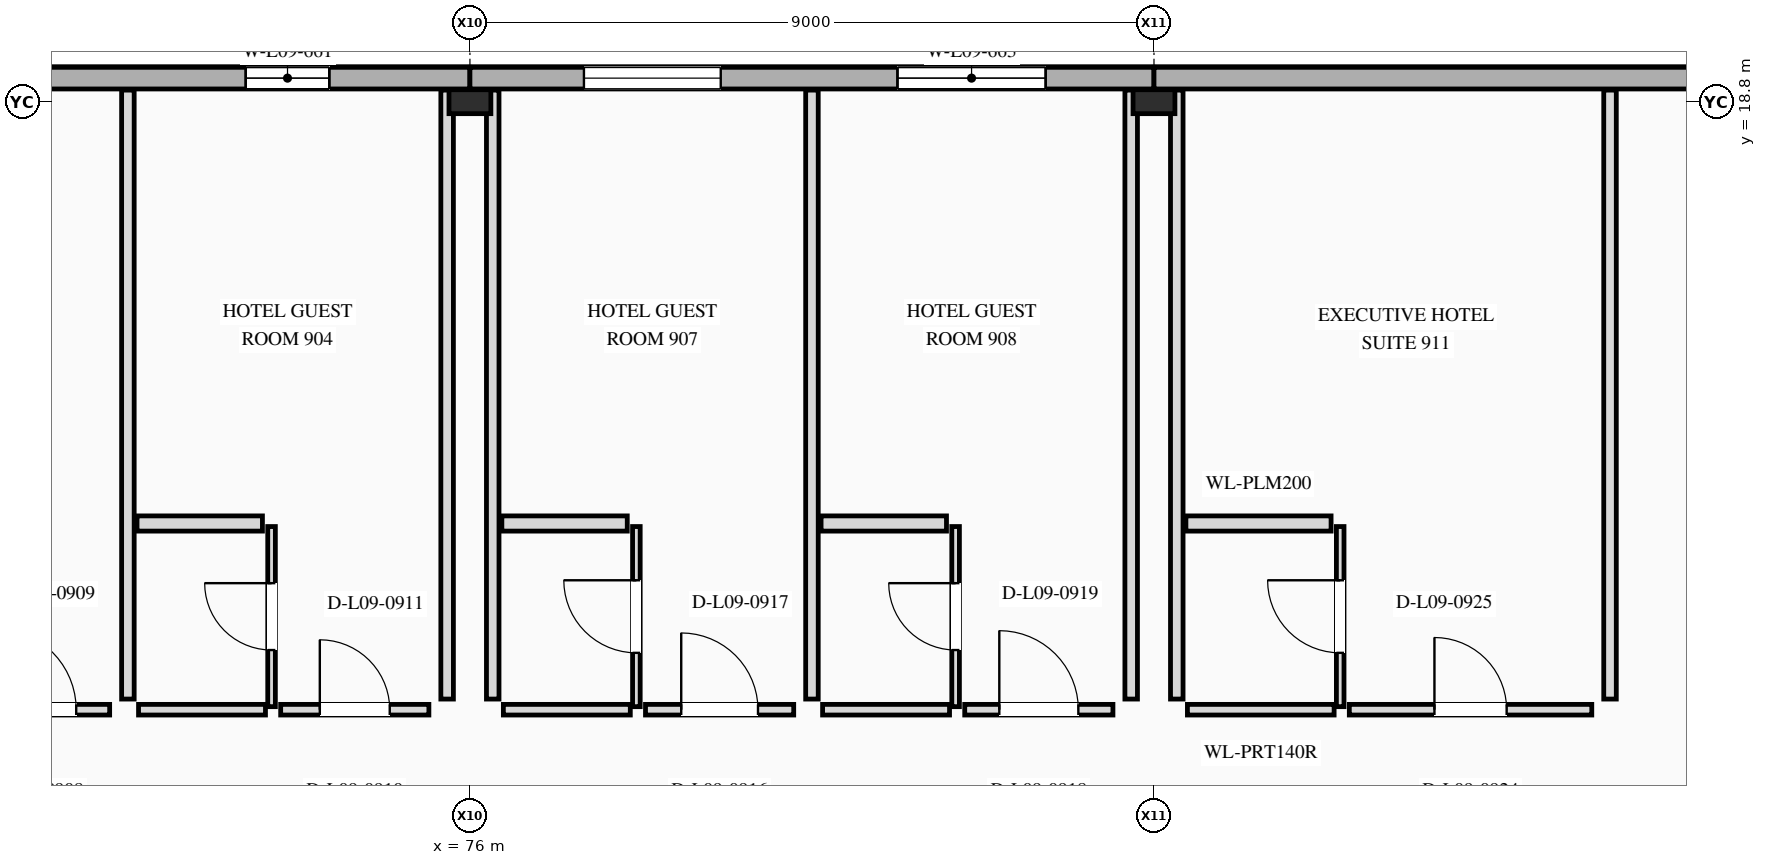
"""IFC4 building model, lengths in metres.
Left out: names, types, materials, properties, quantities, classifications, styles, units other than length and angle.
Written with IfcOpenShell. Run it as: python <this file> out.ifc"""

import sys

from ifc_helpers import new_model, si_unit, direction, frame, frame_2d, origin, origin_2d, place, context, subcontext, project, spatial, rectangle, i_section, extrude, element, fill, save


model = new_model("IFC4")
c1 = context("Model", 3, precision=1e-05, world=origin(), true_north=direction((0.0, 1.0)))
c2 = subcontext(c1, "Body", "Model", "MODEL_VIEW")
j1 = project(units=[si_unit("LENGTHUNIT", "METRE"), si_unit("PLANEANGLEUNIT", "RADIAN")], contexts=[c1])
p1 = place(None, origin())
s1 = spatial("IfcSite", under=j1, at=p1, CompositionType="ELEMENT")
p2 = place(p1, origin())
s2 = spatial("IfcBuilding", under=s1, at=p2, CompositionType="ELEMENT")
p3 = place(p2, frame((0.0, 0.0, 37.6)))
s3 = spatial("IfcBuildingStorey", under=s2, at=p3, CompositionType="ELEMENT", Elevation=37.6)
for number, where, z_axis, x_axis in (
    (1, (76.0, 18.8, 0.0), (0.0, 0.0, 1.0), (0.0, 1.0, 0.0)),
    (2, (85.0, 18.8, 0.0), (0.0, 0.0, 1.0), (0.0, 1.0, 0.0)),
):
    element("IfcColumn", number, at=place(p3, frame(where, z_axis=z_axis, x_axis=x_axis)), inside=s3, PredefinedType="COLUMN", context=c2, shape_type="SweptSolid", body=[
        extrude(i_section(OverallWidth=0.315, OverallDepth=0.551, WebThickness=0.015, FlangeThickness=0.024, at=origin_2d()), origin(), (0.0, 0.0, 1.0), 3.5),
    ])
p4 = place(p3, frame((76.0, 19.11, 0.0), z_axis=(0.0, 0.0, 1.0), x_axis=(-1.0, 0.0, 0.0)))
e3 = element("IfcWall", 3, at=p4, inside=s3, PredefinedType="STANDARD", context=c2, shape_type="SweptSolid", body=[
    extrude(rectangle(XDim=9.31, YDim=0.285, at=frame_2d((4.655, 0.0))), origin(), (0.0, 0.0, 1.0), 3.5),
])
p5 = place(p4, frame((6.0, 0.0, 0.85)))
e4 = element("IfcOpeningElement", 4, at=p5, cuts=e3, PredefinedType="OPENING", context=c2, shape_type="SweptSolid", body=[
    extrude(rectangle(XDim=1.2, YDim=1.6, at=frame_2d((0.6, 0.8))), frame((0.0, 0.152, 0.0), z_axis=(0.0, -1.0, 0.0), x_axis=(1.0, 0.0, 0.0)), (0.0, 0.0, 1.0), 0.305),
])
p6 = place(p4, frame((1.85, 0.0, 0.85)))
e5 = element("IfcOpeningElement", 5, at=p6, cuts=e3, PredefinedType="OPENING", context=c2, shape_type="SweptSolid", body=[
    extrude(rectangle(XDim=1.1, YDim=1.5, at=frame_2d((0.55, 0.75))), frame((0.0, 0.152, 0.0), z_axis=(0.0, -1.0, 0.0), x_axis=(1.0, 0.0, 0.0)), (0.0, 0.0, 1.0), 0.305),
])
p7 = place(p3, frame((85.0, 19.11, 0.0), z_axis=(0.0, 0.0, 1.0), x_axis=(-1.0, 0.0, 0.0)))
e6 = element("IfcWall", 6, at=p7, inside=s3, PredefinedType="STANDARD", context=c2, shape_type="SweptSolid", body=[
    extrude(rectangle(XDim=9.0, YDim=0.285, at=frame_2d((4.5, 0.0))), origin(), (0.0, 0.0, 1.0), 3.5),
])
p8 = place(p7, frame((5.7, 0.0, 0.85)))
e7 = element("IfcOpeningElement", 7, at=p8, cuts=e6, PredefinedType="OPENING", context=c2, shape_type="SweptSolid", body=[
    extrude(rectangle(XDim=1.8, YDim=1.8, at=frame_2d((0.9, 0.9))), frame((0.0, 0.152, 0.0), z_axis=(0.0, -1.0, 0.0), x_axis=(1.0, 0.0, 0.0)), (0.0, 0.0, 1.0), 0.305),
])
p9 = place(p7, frame((1.425, 0.0, 0.85)))
e8 = element("IfcOpeningElement", 8, at=p9, cuts=e6, PredefinedType="OPENING", context=c2, shape_type="SweptSolid", body=[
    extrude(rectangle(XDim=1.95, YDim=1.85, at=frame_2d((0.975, 0.925))), frame((0.0, 0.152, 0.0), z_axis=(0.0, -1.0, 0.0), x_axis=(1.0, 0.0, 0.0)), (0.0, 0.0, 1.0), 0.305),
])
p10 = place(p3, frame((94.0, 19.11, 0.0), z_axis=(0.0, 0.0, 1.0), x_axis=(-1.0, 0.0, 0.0)))
e9 = element("IfcWall", 9, at=p10, inside=s3, PredefinedType="STANDARD", context=c2, shape_type="SweptSolid", body=[
    extrude(rectangle(XDim=9.0, YDim=0.285, at=frame_2d((4.5, 0.0))), origin(), (0.0, 0.0, 1.0), 3.5),
])
p11 = place(p3, frame((69.31, 10.8, 0.0), z_axis=(0.0, 0.0, 1.0), x_axis=(1.0, 0.0, 0.0)))
e10 = element("IfcWall", 10, at=p11, inside=s3, PredefinedType="PARTITIONING", context=c2, shape_type="SweptSolid", body=[
    extrude(rectangle(XDim=1.95, YDim=0.14, at=frame_2d((0.975, 0.0))), origin(), (0.0, 0.0, 1.0), 3.2),
])
p12 = place(p11, frame((0.44, 0.0, 0.0)))
e11 = element("IfcOpeningElement", 11, at=p12, cuts=e10, PredefinedType="OPENING", context=c2, shape_type="SweptSolid", body=[
    extrude(rectangle(XDim=1.07, YDim=2.4, at=frame_2d((0.535, 1.2))), frame((0.0, 0.08, 0.0), z_axis=(0.0, -1.0, 0.0), x_axis=(1.0, 0.0, 0.0)), (0.0, 0.0, 1.0), 0.16),
])
p13 = place(p3, frame((71.5, 10.94, 0.0), z_axis=(0.0, 0.0, 1.0), x_axis=(0.0, 1.0, 0.0)))
e12 = element("IfcWall", 12, at=p13, inside=s3, PredefinedType="PARTITIONING", context=c2, shape_type="SweptSolid", body=[
    extrude(rectangle(XDim=8.012, YDim=0.165, at=frame_2d((4.006, 0.0))), origin(), (0.0, 0.0, 1.0), 2.613),
])
p14 = place(p3, frame((71.64, 10.8, 0.0), z_axis=(0.0, 0.0, 1.0), x_axis=(1.0, 0.0, 0.0)))
e13 = element("IfcWall", 13, at=p14, inside=s3, PredefinedType="PARTITIONING", context=c2, shape_type="SweptSolid", body=[
    extrude(rectangle(XDim=1.67, YDim=0.14, at=frame_2d((0.835, 0.0))), origin(), (0.0, 0.0, 1.0), 3.2),
])
p15 = place(p3, frame((73.51, 10.8, 0.0), z_axis=(0.0, 0.0, 1.0), x_axis=(1.0, 0.0, 0.0)))
e14 = element("IfcWall", 14, at=p15, inside=s3, PredefinedType="PARTITIONING", context=c2, shape_type="SweptSolid", body=[
    extrude(rectangle(XDim=1.95, YDim=0.14, at=frame_2d((0.975, 0.0))), origin(), (0.0, 0.0, 1.0), 3.2),
])
p16 = place(p15, frame((0.515, 0.0, 0.0)))
e15 = element("IfcOpeningElement", 15, at=p16, cuts=e14, PredefinedType="OPENING", context=c2, shape_type="SweptSolid", body=[
    extrude(rectangle(XDim=0.92, YDim=2.15, at=frame_2d((0.46, 1.075))), frame((0.0, 0.08, 0.0), z_axis=(0.0, -1.0, 0.0), x_axis=(1.0, 0.0, 0.0)), (0.0, 0.0, 1.0), 0.16),
])
p17 = place(p3, frame((75.7, 10.94, 0.0), z_axis=(0.0, 0.0, 1.0), x_axis=(0.0, 1.0, 0.0)))
e16 = element("IfcWall", 16, at=p17, inside=s3, PredefinedType="PARTITIONING", context=c2, shape_type="SweptSolid", body=[
    extrude(rectangle(XDim=8.012, YDim=0.165, at=frame_2d((4.006, 0.0))), origin(), (0.0, 0.0, 1.0), 2.529),
])
p18 = place(p3, frame((73.39, 10.84, 0.0), z_axis=(0.0, 0.0, 1.0), x_axis=(0.0, 1.0, 0.0)))
e17 = element("IfcWall", 17, at=p18, inside=s3, PredefinedType="PARTITIONING", context=c2, shape_type="SweptSolid", body=[
    extrude(rectangle(XDim=2.37, YDim=0.1, at=frame_2d((1.185, 0.0))), origin(), (0.0, 0.0, 1.0), 2.808),
])
p19 = place(p18, frame((0.745, 0.0, 0.0)))
e18 = element("IfcOpeningElement", 18, at=p19, cuts=e17, PredefinedType="OPENING", context=c2, shape_type="SweptSolid", body=[
    extrude(rectangle(XDim=0.88, YDim=2.18, at=frame_2d((0.44, 1.09))), frame((0.0, 0.06, 0.0), z_axis=(0.0, -1.0, 0.0), x_axis=(1.0, 0.0, 0.0)), (0.0, 0.0, 1.0), 0.12),
])
p20 = place(p3, frame((71.62, 13.25, 0.0), z_axis=(0.0, 0.0, 1.0), x_axis=(1.0, 0.0, 0.0)))
e19 = element("IfcWall", 19, at=p20, inside=s3, PredefinedType="PLUMBINGWALL", context=c2, shape_type="SweptSolid", body=[
    extrude(rectangle(XDim=1.65, YDim=0.2, at=frame_2d((0.825, 0.0))), origin(), (0.0, 0.0, 1.0), 3.2),
])
p21 = place(p3, frame((76.44, 10.8, 0.0), z_axis=(0.0, 0.0, 1.0), x_axis=(1.0, 0.0, 0.0)))
e20 = element("IfcWall", 20, at=p21, inside=s3, PredefinedType="PARTITIONING", context=c2, shape_type="SweptSolid", body=[
    extrude(rectangle(XDim=1.67, YDim=0.14, at=frame_2d((0.835, 0.0))), origin(), (0.0, 0.0, 1.0), 3.2),
])
p22 = place(p3, frame((78.31, 10.8, 0.0), z_axis=(0.0, 0.0, 1.0), x_axis=(1.0, 0.0, 0.0)))
e21 = element("IfcWall", 21, at=p22, inside=s3, PredefinedType="PARTITIONING", context=c2, shape_type="SweptSolid", body=[
    extrude(rectangle(XDim=1.95, YDim=0.14, at=frame_2d((0.975, 0.0))), origin(), (0.0, 0.0, 1.0), 3.2),
])
p23 = place(p22, frame((0.47, 0.0, 0.0)))
e22 = element("IfcOpeningElement", 22, at=p23, cuts=e21, PredefinedType="OPENING", context=c2, shape_type="SweptSolid", body=[
    extrude(rectangle(XDim=1.01, YDim=2.2, at=frame_2d((0.505, 1.1))), frame((0.0, 0.08, 0.0), z_axis=(0.0, -1.0, 0.0), x_axis=(1.0, 0.0, 0.0)), (0.0, 0.0, 1.0), 0.16),
])
p24 = place(p3, frame((76.3, 10.94, 0.0), z_axis=(0.0, 0.0, 1.0), x_axis=(0.0, 1.0, 0.0)))
e23 = element("IfcWall", 23, at=p24, inside=s3, PredefinedType="PARTITIONING", context=c2, shape_type="SweptSolid", body=[
    extrude(rectangle(XDim=8.012, YDim=0.165, at=frame_2d((4.006, 0.0))), origin(), (0.0, 0.0, 1.0), 2.529),
])
p25 = place(p3, frame((80.5, 10.94, 0.0), z_axis=(0.0, 0.0, 1.0), x_axis=(0.0, 1.0, 0.0)))
e24 = element("IfcWall", 24, at=p25, inside=s3, PredefinedType="PARTITIONING", context=c2, shape_type="SweptSolid", body=[
    extrude(rectangle(XDim=8.012, YDim=0.165, at=frame_2d((4.006, 0.0))), origin(), (0.0, 0.0, 1.0), 2.613),
])
p26 = place(p3, frame((78.19, 10.84, 0.0), z_axis=(0.0, 0.0, 1.0), x_axis=(0.0, 1.0, 0.0)))
e25 = element("IfcWall", 25, at=p26, inside=s3, PredefinedType="PARTITIONING", context=c2, shape_type="SweptSolid", body=[
    extrude(rectangle(XDim=2.37, YDim=0.1, at=frame_2d((1.185, 0.0))), origin(), (0.0, 0.0, 1.0), 2.808),
])
p27 = place(p26, frame((0.708, 0.0, 0.0)))
e26 = element("IfcOpeningElement", 26, at=p27, cuts=e25, PredefinedType="OPENING", context=c2, shape_type="SweptSolid", body=[
    extrude(rectangle(XDim=0.955, YDim=2.22, at=frame_2d((0.478, 1.11))), frame((0.0, 0.06, 0.0), z_axis=(0.0, -1.0, 0.0), x_axis=(1.0, 0.0, 0.0)), (0.0, 0.0, 1.0), 0.12),
])
p28 = place(p3, frame((76.42, 13.25, 0.0), z_axis=(0.0, 0.0, 1.0), x_axis=(1.0, 0.0, 0.0)))
e27 = element("IfcWall", 27, at=p28, inside=s3, PredefinedType="PLUMBINGWALL", context=c2, shape_type="SweptSolid", body=[
    extrude(rectangle(XDim=1.65, YDim=0.2, at=frame_2d((0.825, 0.0))), origin(), (0.0, 0.0, 1.0), 3.2),
])
p29 = place(p3, frame((80.64, 10.8, 0.0), z_axis=(0.0, 0.0, 1.0), x_axis=(1.0, 0.0, 0.0)))
e28 = element("IfcWall", 28, at=p29, inside=s3, PredefinedType="PARTITIONING", context=c2, shape_type="SweptSolid", body=[
    extrude(rectangle(XDim=1.67, YDim=0.14, at=frame_2d((0.835, 0.0))), origin(), (0.0, 0.0, 1.0), 3.2),
])
p30 = place(p3, frame((82.51, 10.8, 0.0), z_axis=(0.0, 0.0, 1.0), x_axis=(1.0, 0.0, 0.0)))
e29 = element("IfcWall", 29, at=p30, inside=s3, PredefinedType="PARTITIONING", context=c2, shape_type="SweptSolid", body=[
    extrude(rectangle(XDim=1.95, YDim=0.14, at=frame_2d((0.975, 0.0))), origin(), (0.0, 0.0, 1.0), 3.2),
])
p31 = place(p30, frame((0.455, 0.0, 0.0)))
e30 = element("IfcOpeningElement", 30, at=p31, cuts=e29, PredefinedType="OPENING", context=c2, shape_type="SweptSolid", body=[
    extrude(rectangle(XDim=1.04, YDim=2.25, at=frame_2d((0.52, 1.125))), frame((0.0, 0.08, 0.0), z_axis=(0.0, -1.0, 0.0), x_axis=(1.0, 0.0, 0.0)), (0.0, 0.0, 1.0), 0.16),
])
p32 = place(p3, frame((84.7, 10.94, 0.0), z_axis=(0.0, 0.0, 1.0), x_axis=(0.0, 1.0, 0.0)))
e31 = element("IfcWall", 31, at=p32, inside=s3, PredefinedType="PARTITIONING", context=c2, shape_type="SweptSolid", body=[
    extrude(rectangle(XDim=8.012, YDim=0.165, at=frame_2d((4.006, 0.0))), origin(), (0.0, 0.0, 1.0), 2.529),
])
p33 = place(p3, frame((82.39, 10.84, 0.0), z_axis=(0.0, 0.0, 1.0), x_axis=(0.0, 1.0, 0.0)))
e32 = element("IfcWall", 32, at=p33, inside=s3, PredefinedType="PARTITIONING", context=c2, shape_type="SweptSolid", body=[
    extrude(rectangle(XDim=2.37, YDim=0.1, at=frame_2d((1.185, 0.0))), origin(), (0.0, 0.0, 1.0), 2.808),
])
p34 = place(p33, frame((0.745, 0.0, 0.0)))
e33 = element("IfcOpeningElement", 33, at=p34, cuts=e32, PredefinedType="OPENING", context=c2, shape_type="SweptSolid", body=[
    extrude(rectangle(XDim=0.88, YDim=2.1, at=frame_2d((0.44, 1.05))), frame((0.0, 0.06, 0.0), z_axis=(0.0, -1.0, 0.0), x_axis=(1.0, 0.0, 0.0)), (0.0, 0.0, 1.0), 0.12),
])
p35 = place(p3, frame((80.62, 13.25, 0.0), z_axis=(0.0, 0.0, 1.0), x_axis=(1.0, 0.0, 0.0)))
e34 = element("IfcWall", 34, at=p35, inside=s3, PredefinedType="PLUMBINGWALL", context=c2, shape_type="SweptSolid", body=[
    extrude(rectangle(XDim=1.65, YDim=0.2, at=frame_2d((0.825, 0.0))), origin(), (0.0, 0.0, 1.0), 3.2),
])
p36 = place(p3, frame((85.44, 10.8, 0.0), z_axis=(0.0, 0.0, 1.0), x_axis=(1.0, 0.0, 0.0)))
e35 = element("IfcWall", 35, at=p36, inside=s3, PredefinedType="PARTITIONING", context=c2, shape_type="SweptSolid", body=[
    extrude(rectangle(XDim=1.93, YDim=0.14, at=frame_2d((0.965, 0.0))), origin(), (0.0, 0.0, 1.0), 3.2),
])
p37 = place(p3, frame((87.57, 10.8, 0.0), z_axis=(0.0, 0.0, 1.0), x_axis=(1.0, 0.0, 0.0)))
e36 = element("IfcWall", 36, at=p37, inside=s3, PredefinedType="PARTITIONING", context=c2, shape_type="SweptSolid", body=[
    extrude(rectangle(XDim=3.19, YDim=0.14, at=frame_2d((1.595, 0.0))), origin(), (0.0, 0.0, 1.0), 3.2),
])
p38 = place(p37, frame((1.12, 0.0, 0.0)))
e37 = element("IfcOpeningElement", 37, at=p38, cuts=e36, PredefinedType="OPENING", context=c2, shape_type="SweptSolid", body=[
    extrude(rectangle(XDim=0.95, YDim=2.3, at=frame_2d((0.475, 1.15))), frame((0.0, 0.08, 0.0), z_axis=(0.0, -1.0, 0.0), x_axis=(1.0, 0.0, 0.0)), (0.0, 0.0, 1.0), 0.16),
])
p39 = place(p3, frame((85.3, 10.94, 0.0), z_axis=(0.0, 0.0, 1.0), x_axis=(0.0, 1.0, 0.0)))
e38 = element("IfcWall", 38, at=p39, inside=s3, PredefinedType="PARTITIONING", context=c2, shape_type="SweptSolid", body=[
    extrude(rectangle(XDim=8.012, YDim=0.165, at=frame_2d((4.006, 0.0))), origin(), (0.0, 0.0, 1.0), 2.529),
])
p40 = place(p3, frame((91.0, 10.94, 0.0), z_axis=(0.0, 0.0, 1.0), x_axis=(0.0, 1.0, 0.0)))
e39 = element("IfcWall", 39, at=p40, inside=s3, PredefinedType="PARTITIONING", context=c2, shape_type="SweptSolid", body=[
    extrude(rectangle(XDim=8.012, YDim=0.165, at=frame_2d((4.006, 0.0))), origin(), (0.0, 0.0, 1.0), 3.2),
])
p41 = place(p3, frame((87.45, 10.84, 0.0), z_axis=(0.0, 0.0, 1.0), x_axis=(0.0, 1.0, 0.0)))
e40 = element("IfcWall", 40, at=p41, inside=s3, PredefinedType="PARTITIONING", context=c2, shape_type="SweptSolid", body=[
    extrude(rectangle(XDim=2.37, YDim=0.1, at=frame_2d((1.185, 0.0))), origin(), (0.0, 0.0, 1.0), 3.2),
])
p42 = place(p41, frame((0.708, 0.0, 0.0)))
e41 = element("IfcOpeningElement", 41, at=p42, cuts=e40, PredefinedType="OPENING", context=c2, shape_type="SweptSolid", body=[
    extrude(rectangle(XDim=0.955, YDim=2.14, at=frame_2d((0.478, 1.07))), frame((0.0, 0.06, 0.0), z_axis=(0.0, -1.0, 0.0), x_axis=(1.0, 0.0, 0.0)), (0.0, 0.0, 1.0), 0.12),
])
p43 = place(p3, frame((85.42, 13.25, 0.0), z_axis=(0.0, 0.0, 1.0), x_axis=(1.0, 0.0, 0.0)))
e42 = element("IfcWall", 42, at=p43, inside=s3, PredefinedType="PLUMBINGWALL", context=c2, shape_type="SweptSolid", body=[
    extrude(rectangle(XDim=1.91, YDim=0.2, at=frame_2d((0.955, 0.0))), origin(), (0.0, 0.0, 1.0), 3.2),
])
p44 = place(p6, origin())
e43 = element("IfcWindow", 43, at=p44, inside=s3, PartitioningType="SINGLE_PANEL", PredefinedType="WINDOW", context=c2, shape_type="SweptSolid", body=[
    extrude(rectangle(XDim=1.1, YDim=1.5, at=frame_2d((0.55, 0.75))), frame((0.0, 0.03, 0.0), z_axis=(0.0, -1.0, 0.0), x_axis=(1.0, 0.0, 0.0)), (0.0, 0.0, 1.0), 0.06),
])
fill(e5, e43)
p45 = place(p8, origin())
e44 = element("IfcWindow", 44, at=p45, inside=s3, PartitioningType="SINGLE_PANEL", PredefinedType="WINDOW", context=c2, shape_type="SweptSolid", body=[
    extrude(rectangle(XDim=1.8, YDim=1.8, at=frame_2d((0.9, 0.9))), frame((0.0, 0.03, 0.0), z_axis=(0.0, -1.0, 0.0), x_axis=(1.0, 0.0, 0.0)), (0.0, 0.0, 1.0), 0.06),
])
fill(e7, e44)
p46 = place(p9, origin())
e45 = element("IfcWindow", 45, at=p46, inside=s3, PartitioningType="SINGLE_PANEL", PredefinedType="WINDOW", context=c2, shape_type="SweptSolid", body=[
    extrude(rectangle(XDim=1.95, YDim=1.85, at=frame_2d((0.975, 0.925))), frame((0.0, 0.03, 0.0), z_axis=(0.0, -1.0, 0.0), x_axis=(1.0, 0.0, 0.0)), (0.0, 0.0, 1.0), 0.06),
])
fill(e8, e45)
p47 = place(p12, origin())
e46 = element("IfcDoor", 46, at=p47, inside=s3, OperationType="SINGLE_SWING_LEFT", PredefinedType="DOOR", context=c2, shape_type="SweptSolid", body=[
    extrude(rectangle(XDim=1.07, YDim=2.4, at=frame_2d((0.535, 1.2))), frame((0.0, 0.025, 0.0), z_axis=(0.0, -1.0, 0.0), x_axis=(1.0, 0.0, 0.0)), (0.0, 0.0, 1.0), 0.05),
])
fill(e11, e46)
p48 = place(p16, origin())
e47 = element("IfcDoor", 47, at=p48, inside=s3, OperationType="SINGLE_SWING_LEFT", PredefinedType="DOOR", context=c2, shape_type="SweptSolid", body=[
    extrude(rectangle(XDim=0.92, YDim=2.15, at=frame_2d((0.46, 1.075))), frame((0.0, 0.025, 0.0), z_axis=(0.0, -1.0, 0.0), x_axis=(1.0, 0.0, 0.0)), (0.0, 0.0, 1.0), 0.05),
])
fill(e15, e47)
p49 = place(p19, origin())
e48 = element("IfcDoor", 48, at=p49, inside=s3, OperationType="SINGLE_SWING_RIGHT", PredefinedType="DOOR", context=c2, shape_type="SweptSolid", body=[
    extrude(rectangle(XDim=0.88, YDim=2.18, at=frame_2d((0.44, 1.09))), frame((0.0, 0.025, 0.0), z_axis=(0.0, -1.0, 0.0), x_axis=(1.0, 0.0, 0.0)), (0.0, 0.0, 1.0), 0.05),
])
fill(e18, e48)
p50 = place(p23, origin())
e49 = element("IfcDoor", 49, at=p50, inside=s3, OperationType="SINGLE_SWING_LEFT", PredefinedType="DOOR", context=c2, shape_type="SweptSolid", body=[
    extrude(rectangle(XDim=1.01, YDim=2.2, at=frame_2d((0.505, 1.1))), frame((0.0, 0.025, 0.0), z_axis=(0.0, -1.0, 0.0), x_axis=(1.0, 0.0, 0.0)), (0.0, 0.0, 1.0), 0.05),
])
fill(e22, e49)
p51 = place(p27, origin())
e50 = element("IfcDoor", 50, at=p51, inside=s3, OperationType="SINGLE_SWING_RIGHT", PredefinedType="DOOR", context=c2, shape_type="SweptSolid", body=[
    extrude(rectangle(XDim=0.955, YDim=2.22, at=frame_2d((0.478, 1.11))), frame((0.0, 0.025, 0.0), z_axis=(0.0, -1.0, 0.0), x_axis=(1.0, 0.0, 0.0)), (0.0, 0.0, 1.0), 0.05),
])
fill(e26, e50)
p52 = place(p31, origin())
e51 = element("IfcDoor", 51, at=p52, inside=s3, OperationType="SINGLE_SWING_LEFT", PredefinedType="DOOR", context=c2, shape_type="SweptSolid", body=[
    extrude(rectangle(XDim=1.04, YDim=2.25, at=frame_2d((0.52, 1.125))), frame((0.0, 0.025, 0.0), z_axis=(0.0, -1.0, 0.0), x_axis=(1.0, 0.0, 0.0)), (0.0, 0.0, 1.0), 0.05),
])
fill(e30, e51)
p53 = place(p34, origin())
e52 = element("IfcDoor", 52, at=p53, inside=s3, OperationType="SINGLE_SWING_RIGHT", PredefinedType="DOOR", context=c2, shape_type="SweptSolid", body=[
    extrude(rectangle(XDim=0.88, YDim=2.1, at=frame_2d((0.44, 1.05))), frame((0.0, 0.025, 0.0), z_axis=(0.0, -1.0, 0.0), x_axis=(1.0, 0.0, 0.0)), (0.0, 0.0, 1.0), 0.05),
])
fill(e33, e52)
p54 = place(p38, origin())
e53 = element("IfcDoor", 53, at=p54, inside=s3, OperationType="SINGLE_SWING_LEFT", PredefinedType="DOOR", context=c2, shape_type="SweptSolid", body=[
    extrude(rectangle(XDim=0.95, YDim=2.3, at=frame_2d((0.475, 1.15))), frame((0.0, 0.025, 0.0), z_axis=(0.0, -1.0, 0.0), x_axis=(1.0, 0.0, 0.0)), (0.0, 0.0, 1.0), 0.05),
])
fill(e37, e53)
p55 = place(p42, origin())
e54 = element("IfcDoor", 54, at=p55, inside=s3, OperationType="SINGLE_SWING_RIGHT", PredefinedType="DOOR", context=c2, shape_type="SweptSolid", body=[
    extrude(rectangle(XDim=0.955, YDim=2.14, at=frame_2d((0.478, 1.07))), frame((0.0, 0.025, 0.0), z_axis=(0.0, -1.0, 0.0), x_axis=(1.0, 0.0, 0.0)), (0.0, 0.0, 1.0), 0.05),
])
fill(e41, e54)
save(model, sys.argv[1])
